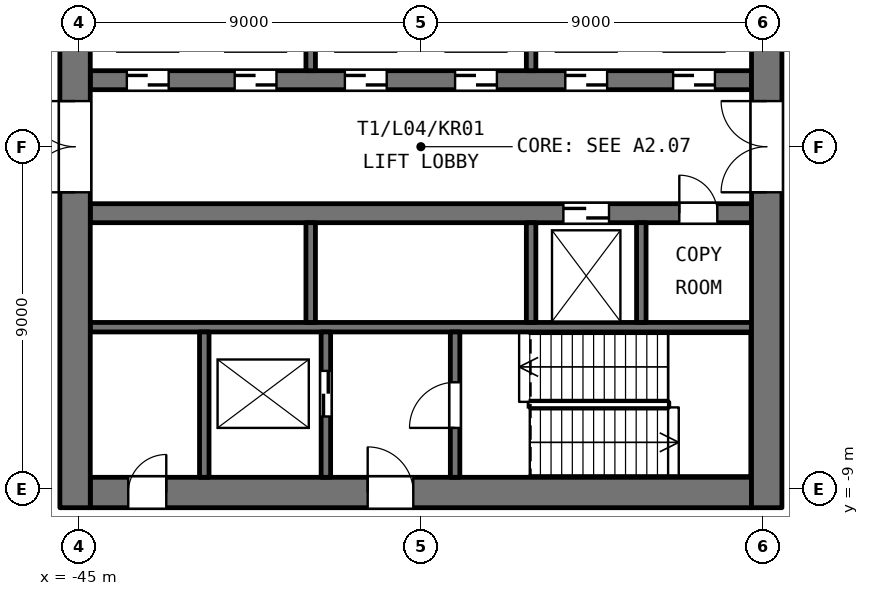
"""IFC4 building model, lengths in metres.
Left out: names, types, materials, properties, quantities, classifications, styles, units other than length and angle.
Written with IfcOpenShell. Run it as: python <this file> out.ifc"""

import sys

from ifc_helpers import new_model, si_unit, direction, frame, frame_2d, origin, place, context, subcontext, project, spatial, rectangle, extrude, element, fill, save


model = new_model("IFC4")
c1 = context("Model", 3, precision=1e-05, world=origin(), true_north=direction((0.0, 1.0)))
c2 = subcontext(c1, "Body", "Model", "MODEL_VIEW")
j1 = project(units=[si_unit("LENGTHUNIT", "METRE"), si_unit("PLANEANGLEUNIT", "RADIAN")], contexts=[c1])
p1 = place(None, origin())
s1 = spatial("IfcSite", under=j1, at=p1, CompositionType="ELEMENT")
p2 = place(p1, origin())
s2 = spatial("IfcBuilding", under=s1, at=p2, CompositionType="ELEMENT")
p3 = place(p2, frame((0.0, 0.0, 22.8)))
s3 = spatial("IfcBuildingStorey", under=s2, at=p3, CompositionType="ELEMENT", Elevation=22.8)
p4 = place(p3, frame((-44.7, -9.1, 0.0), z_axis=(0.0, 0.0, 1.0), x_axis=(1.0, 0.0, 0.0)))
e1 = element("IfcWall", 1, at=p4, inside=s3, PredefinedType="SHEAR", context=c2, shape_type="SweptSolid", body=[
    extrude(rectangle(XDim=17.4, YDim=0.8, at=frame_2d((8.7, 0.0))), origin(), (0.0, 0.0, 1.0), 4.5),
])
p5 = place(p4, frame((7.3, 0.0, 0.0)))
e2 = element("IfcOpeningElement", 2, at=p5, cuts=e1, PredefinedType="OPENING", context=c2, shape_type="SweptSolid", body=[
    extrude(rectangle(XDim=1.2, YDim=2.1, at=frame_2d((0.6, 1.05))), frame((0.0, 0.41, 0.0), z_axis=(0.0, -1.0, 0.0), x_axis=(1.0, 0.0, 0.0)), (0.0, 0.0, 1.0), 0.82),
])
p6 = place(p4, frame((1.0, 0.0, 0.0)))
e3 = element("IfcOpeningElement", 3, at=p6, cuts=e1, PredefinedType="OPENING", context=c2, shape_type="SweptSolid", body=[
    extrude(rectangle(XDim=1.0, YDim=2.1, at=frame_2d((0.5, 1.05))), frame((0.0, 0.41, 0.0), z_axis=(0.0, -1.0, 0.0), x_axis=(1.0, 0.0, 0.0)), (0.0, 0.0, 1.0), 0.82),
])
p7 = place(p3, frame((-44.7, -4.75, 0.0), z_axis=(0.0, 0.0, 1.0), x_axis=(1.0, 0.0, 0.0)))
e4 = element("IfcWall", 4, at=p7, inside=s3, PredefinedType="SHEAR", context=c2, shape_type="SweptSolid", body=[
    extrude(rectangle(XDim=17.4, YDim=0.25, at=frame_2d((8.7, 0.0))), origin(), (0.0, 0.0, 1.0), 4.5),
])
p8 = place(p3, frame((-44.7, -1.75, 0.0), z_axis=(0.0, 0.0, 1.0), x_axis=(1.0, 0.0, 0.0)))
e5 = element("IfcWall", 5, at=p8, inside=s3, PredefinedType="SHEAR", context=c2, shape_type="SweptSolid", body=[
    extrude(rectangle(XDim=17.4, YDim=0.5, at=frame_2d((8.7, 0.0))), origin(), (0.0, 0.0, 1.0), 4.5),
])
p9 = place(p8, frame((12.45, 0.0, 0.0)))
e6 = element("IfcOpeningElement", 6, at=p9, cuts=e5, PredefinedType="OPENING", context=c2, shape_type="SweptSolid", body=[
    extrude(rectangle(XDim=1.2, YDim=2.1, at=frame_2d((0.6, 1.05))), frame((0.0, 0.26, 0.0), z_axis=(0.0, -1.0, 0.0), x_axis=(1.0, 0.0, 0.0)), (0.0, 0.0, 1.0), 0.52),
])
p10 = place(p8, frame((15.5, 0.0, 0.0)))
e7 = element("IfcOpeningElement", 7, at=p10, cuts=e5, PredefinedType="OPENING", context=c2, shape_type="SweptSolid", body=[
    extrude(rectangle(XDim=1.0, YDim=2.1, at=frame_2d((0.5, 1.05))), frame((0.0, 0.26, 0.0), z_axis=(0.0, -1.0, 0.0), x_axis=(1.0, 0.0, 0.0)), (0.0, 0.0, 1.0), 0.52),
])
p11 = place(p3, frame((-44.7, 1.75, 0.0), z_axis=(0.0, 0.0, 1.0), x_axis=(1.0, 0.0, 0.0)))
e8 = element("IfcWall", 8, at=p11, inside=s3, PredefinedType="SHEAR", context=c2, shape_type="SweptSolid", body=[
    extrude(rectangle(XDim=17.4, YDim=0.5, at=frame_2d((8.7, 0.0))), origin(), (0.0, 0.0, 1.0), 4.5),
])
p12 = place(p11, frame((0.962, 0.0, 0.0)))
e9 = element("IfcOpeningElement", 9, at=p12, cuts=e8, PredefinedType="OPENING", context=c2, shape_type="SweptSolid", body=[
    extrude(rectangle(XDim=1.1, YDim=2.1, at=frame_2d((0.55, 1.05))), frame((0.0, 0.26, 0.0), z_axis=(0.0, -1.0, 0.0), x_axis=(1.0, 0.0, 0.0)), (0.0, 0.0, 1.0), 0.52),
])
p13 = place(p11, frame((3.8, 0.0, 0.0)))
e10 = element("IfcOpeningElement", 10, at=p13, cuts=e8, PredefinedType="OPENING", context=c2, shape_type="SweptSolid", body=[
    extrude(rectangle(XDim=1.1, YDim=2.1, at=frame_2d((0.55, 1.05))), frame((0.0, 0.26, 0.0), z_axis=(0.0, -1.0, 0.0), x_axis=(1.0, 0.0, 0.0)), (0.0, 0.0, 1.0), 0.52),
])
p14 = place(p11, frame((6.7, 0.0, 0.0)))
e11 = element("IfcOpeningElement", 11, at=p14, cuts=e8, PredefinedType="OPENING", context=c2, shape_type="SweptSolid", body=[
    extrude(rectangle(XDim=1.1, YDim=2.1, at=frame_2d((0.55, 1.05))), frame((0.0, 0.26, 0.0), z_axis=(0.0, -1.0, 0.0), x_axis=(1.0, 0.0, 0.0)), (0.0, 0.0, 1.0), 0.52),
])
p15 = place(p11, frame((9.6, 0.0, 0.0)))
e12 = element("IfcOpeningElement", 12, at=p15, cuts=e8, PredefinedType="OPENING", context=c2, shape_type="SweptSolid", body=[
    extrude(rectangle(XDim=1.1, YDim=2.1, at=frame_2d((0.55, 1.05))), frame((0.0, 0.26, 0.0), z_axis=(0.0, -1.0, 0.0), x_axis=(1.0, 0.0, 0.0)), (0.0, 0.0, 1.0), 0.52),
])
p16 = place(p11, frame((12.5, 0.0, 0.0)))
e13 = element("IfcOpeningElement", 13, at=p16, cuts=e8, PredefinedType="OPENING", context=c2, shape_type="SweptSolid", body=[
    extrude(rectangle(XDim=1.1, YDim=2.1, at=frame_2d((0.55, 1.05))), frame((0.0, 0.26, 0.0), z_axis=(0.0, -1.0, 0.0), x_axis=(1.0, 0.0, 0.0)), (0.0, 0.0, 1.0), 0.52),
])
p17 = place(p11, frame((15.337, 0.0, 0.0)))
e14 = element("IfcOpeningElement", 14, at=p17, cuts=e8, PredefinedType="OPENING", context=c2, shape_type="SweptSolid", body=[
    extrude(rectangle(XDim=1.1, YDim=2.1, at=frame_2d((0.55, 1.05))), frame((0.0, 0.26, 0.0), z_axis=(0.0, -1.0, 0.0), x_axis=(1.0, 0.0, 0.0)), (0.0, 0.0, 1.0), 0.52),
])
p18 = place(p3, frame((-45.1, -9.5, 0.0), z_axis=(0.0, 0.0, 1.0), x_axis=(0.0, 1.0, 0.0)))
e15 = element("IfcWall", 15, at=p18, inside=s3, PredefinedType="SHEAR", context=c2, shape_type="SweptSolid", body=[
    extrude(rectangle(XDim=19.0, YDim=0.8, at=frame_2d((9.5, 0.0))), origin(), (0.0, 0.0, 1.0), 4.5),
])
p19 = place(p18, frame((8.3, 0.0, 0.0)))
e16 = element("IfcOpeningElement", 16, at=p19, cuts=e15, PredefinedType="OPENING", context=c2, shape_type="SweptSolid", body=[
    extrude(rectangle(XDim=2.4, YDim=2.1, at=frame_2d((1.2, 1.05))), frame((0.0, 0.41, 0.0), z_axis=(0.0, -1.0, 0.0), x_axis=(1.0, 0.0, 0.0)), (0.0, 0.0, 1.0), 0.82),
])
p20 = place(p3, frame((-41.7, -8.7, 0.0), z_axis=(0.0, 0.0, 1.0), x_axis=(0.0, 1.0, 0.0)))
e17 = element("IfcWall", 17, at=p20, inside=s3, PredefinedType="SHEAR", context=c2, shape_type="SweptSolid", body=[
    extrude(rectangle(XDim=3.825, YDim=0.25, at=frame_2d((1.913, 0.0))), origin(), (0.0, 0.0, 1.0), 4.5),
])
for number, where, z_axis, x_axis in (
    (18, (-38.9, -4.625, 0.0), (0.0, 0.0, 1.0), (0.0, 1.0, 0.0)),
    (19, (-38.9, 2.0, 0.0), (0.0, 0.0, 1.0), (0.0, 1.0, 0.0)),
):
    element("IfcWall", number, at=place(p3, frame(where, z_axis=z_axis, x_axis=x_axis)), inside=s3, PredefinedType="SHEAR", context=c2, shape_type="SweptSolid", body=[
        extrude(rectangle(XDim=2.625, YDim=0.25, at=frame_2d((1.312, 0.0))), origin(), (0.0, 0.0, 1.0), 4.5),
    ])
p21 = place(p3, frame((-38.5, -8.7, 0.0), z_axis=(0.0, 0.0, 1.0), x_axis=(0.0, 1.0, 0.0)))
e20 = element("IfcWall", 20, at=p21, inside=s3, PredefinedType="SHEAR", context=c2, shape_type="SweptSolid", body=[
    extrude(rectangle(XDim=3.825, YDim=0.25, at=frame_2d((1.913, 0.0))), origin(), (0.0, 0.0, 1.0), 4.5),
])
p22 = place(p21, frame((1.6, 0.0, 0.0)))
e21 = element("IfcOpeningElement", 21, at=p22, cuts=e20, PredefinedType="OPENING", context=c2, shape_type="SweptSolid", body=[
    extrude(rectangle(XDim=1.2, YDim=2.1, at=frame_2d((0.6, 1.05))), frame((0.0, 0.135, 0.0), z_axis=(0.0, -1.0, 0.0), x_axis=(1.0, 0.0, 0.0)), (0.0, 0.0, 1.0), 0.27),
])
p23 = place(p3, frame((-35.1, -8.7, 0.0), z_axis=(0.0, 0.0, 1.0), x_axis=(0.0, 1.0, 0.0)))
e22 = element("IfcWall", 22, at=p23, inside=s3, PredefinedType="SHEAR", context=c2, shape_type="SweptSolid", body=[
    extrude(rectangle(XDim=3.825, YDim=0.25, at=frame_2d((1.913, 0.0))), origin(), (0.0, 0.0, 1.0), 4.5),
])
p24 = place(p23, frame((1.3, 0.0, 0.0)))
e23 = element("IfcOpeningElement", 23, at=p24, cuts=e22, PredefinedType="OPENING", context=c2, shape_type="SweptSolid", body=[
    extrude(rectangle(XDim=1.2, YDim=2.1, at=frame_2d((0.6, 1.05))), frame((0.0, 0.135, 0.0), z_axis=(0.0, -1.0, 0.0), x_axis=(1.0, 0.0, 0.0)), (0.0, 0.0, 1.0), 0.27),
])
for number, where, z_axis, x_axis in (
    (24, (-33.1, -4.625, 0.0), (0.0, 0.0, 1.0), (0.0, 1.0, 0.0)),
    (25, (-33.1, 2.0, 0.0), (0.0, 0.0, 1.0), (0.0, 1.0, 0.0)),
    (26, (-30.2, -4.625, 0.0), (0.0, 0.0, 1.0), (0.0, 1.0, 0.0)),
):
    element("IfcWall", number, at=place(p3, frame(where, z_axis=z_axis, x_axis=x_axis)), inside=s3, PredefinedType="SHEAR", context=c2, shape_type="SweptSolid", body=[
        extrude(rectangle(XDim=2.625, YDim=0.25, at=frame_2d((1.312, 0.0))), origin(), (0.0, 0.0, 1.0), 4.5),
    ])
p25 = place(p3, frame((-26.9, -9.5, 0.0), z_axis=(0.0, 0.0, 1.0), x_axis=(0.0, 1.0, 0.0)))
e27 = element("IfcWall", 27, at=p25, inside=s3, PredefinedType="SHEAR", context=c2, shape_type="SweptSolid", body=[
    extrude(rectangle(XDim=19.0, YDim=0.8, at=frame_2d((9.5, 0.0))), origin(), (0.0, 0.0, 1.0), 4.5),
])
p26 = place(p25, frame((8.3, 0.0, 0.0)))
e28 = element("IfcOpeningElement", 28, at=p26, cuts=e27, PredefinedType="OPENING", context=c2, shape_type="SweptSolid", body=[
    extrude(rectangle(XDim=2.4, YDim=2.1, at=frame_2d((1.2, 1.05))), frame((0.0, 0.41, 0.0), z_axis=(0.0, -1.0, 0.0), x_axis=(1.0, 0.0, 0.0)), (0.0, 0.0, 1.0), 0.82),
])
p27 = place(p19, origin())
e29 = element("IfcDoor", 29, at=p27, inside=s3, OperationType="DOUBLE_DOOR_SINGLE_SWING", PredefinedType="DOOR", context=c2, shape_type="SweptSolid", body=[
    extrude(rectangle(XDim=2.4, YDim=2.1, at=frame_2d((1.2, 1.05))), frame((0.0, -0.225, 0.0), z_axis=(0.0, -1.0, 0.0), x_axis=(1.0, 0.0, 0.0)), (0.0, 0.0, 1.0), 0.05),
])
fill(e16, e29)
p28 = place(p26, origin())
e30 = element("IfcDoor", 30, at=p28, inside=s3, OperationType="DOUBLE_DOOR_SINGLE_SWING", PredefinedType="DOOR", context=c2, shape_type="SweptSolid", body=[
    extrude(rectangle(XDim=2.4, YDim=2.1, at=frame_2d((1.2, 1.05))), frame((0.0, 0.275, 0.0), z_axis=(0.0, -1.0, 0.0), x_axis=(1.0, 0.0, 0.0)), (0.0, 0.0, 1.0), 0.05),
])
fill(e28, e30)
p29 = place(p12, origin())
e31 = element("IfcDoor", 31, at=p29, inside=s3, OperationType="SLIDING_TO_LEFT", PredefinedType="DOOR", context=c2, shape_type="SweptSolid", body=[
    extrude(rectangle(XDim=1.1, YDim=2.1, at=frame_2d((0.55, 1.05))), frame((0.0, 0.025, 0.0), z_axis=(0.0, -1.0, 0.0), x_axis=(1.0, 0.0, 0.0)), (0.0, 0.0, 1.0), 0.05),
])
fill(e9, e31)
p30 = place(p13, origin())
e32 = element("IfcDoor", 32, at=p30, inside=s3, OperationType="SLIDING_TO_LEFT", PredefinedType="DOOR", context=c2, shape_type="SweptSolid", body=[
    extrude(rectangle(XDim=1.1, YDim=2.1, at=frame_2d((0.55, 1.05))), frame((0.0, 0.025, 0.0), z_axis=(0.0, -1.0, 0.0), x_axis=(1.0, 0.0, 0.0)), (0.0, 0.0, 1.0), 0.05),
])
fill(e10, e32)
p31 = place(p14, origin())
e33 = element("IfcDoor", 33, at=p31, inside=s3, OperationType="SLIDING_TO_LEFT", PredefinedType="DOOR", context=c2, shape_type="SweptSolid", body=[
    extrude(rectangle(XDim=1.1, YDim=2.1, at=frame_2d((0.55, 1.05))), frame((0.0, 0.025, 0.0), z_axis=(0.0, -1.0, 0.0), x_axis=(1.0, 0.0, 0.0)), (0.0, 0.0, 1.0), 0.05),
])
fill(e11, e33)
p32 = place(p15, origin())
e34 = element("IfcDoor", 34, at=p32, inside=s3, OperationType="SLIDING_TO_LEFT", PredefinedType="DOOR", context=c2, shape_type="SweptSolid", body=[
    extrude(rectangle(XDim=1.1, YDim=2.1, at=frame_2d((0.55, 1.05))), frame((0.0, 0.025, 0.0), z_axis=(0.0, -1.0, 0.0), x_axis=(1.0, 0.0, 0.0)), (0.0, 0.0, 1.0), 0.05),
])
fill(e12, e34)
p33 = place(p16, origin())
e35 = element("IfcDoor", 35, at=p33, inside=s3, OperationType="SLIDING_TO_LEFT", PredefinedType="DOOR", context=c2, shape_type="SweptSolid", body=[
    extrude(rectangle(XDim=1.1, YDim=2.1, at=frame_2d((0.55, 1.05))), frame((0.0, 0.025, 0.0), z_axis=(0.0, -1.0, 0.0), x_axis=(1.0, 0.0, 0.0)), (0.0, 0.0, 1.0), 0.05),
])
fill(e13, e35)
p34 = place(p17, origin())
e36 = element("IfcDoor", 36, at=p34, inside=s3, OperationType="SLIDING_TO_LEFT", PredefinedType="DOOR", context=c2, shape_type="SweptSolid", body=[
    extrude(rectangle(XDim=1.1, YDim=2.1, at=frame_2d((0.55, 1.05))), frame((0.0, 0.025, 0.0), z_axis=(0.0, -1.0, 0.0), x_axis=(1.0, 0.0, 0.0)), (0.0, 0.0, 1.0), 0.05),
])
fill(e14, e36)
p35 = place(p9, origin())
e37 = element("IfcDoor", 37, at=p35, inside=s3, OperationType="SLIDING_TO_LEFT", PredefinedType="DOOR", context=c2, shape_type="SweptSolid", body=[
    extrude(rectangle(XDim=1.2, YDim=2.1, at=frame_2d((0.6, 1.05))), frame((0.0, 0.025, 0.0), z_axis=(0.0, -1.0, 0.0), x_axis=(1.0, 0.0, 0.0)), (0.0, 0.0, 1.0), 0.05),
])
fill(e6, e37)
p36 = place(p22, origin())
e38 = element("IfcDoor", 38, at=p36, inside=s3, OperationType="SLIDING_TO_LEFT", PredefinedType="DOOR", context=c2, shape_type="SweptSolid", body=[
    extrude(rectangle(XDim=1.2, YDim=2.1, at=frame_2d((0.6, 1.05))), frame((0.0, 0.025, 0.0), z_axis=(0.0, -1.0, 0.0), x_axis=(1.0, 0.0, 0.0)), (0.0, 0.0, 1.0), 0.05),
])
fill(e21, e38)
p37 = place(p10, origin())
e39 = element("IfcDoor", 39, at=p37, inside=s3, OperationType="SINGLE_SWING_LEFT", PredefinedType="DOOR", context=c2, shape_type="SweptSolid", body=[
    extrude(rectangle(XDim=1.0, YDim=2.1, at=frame_2d((0.5, 1.05))), frame((0.0, 0.025, 0.0), z_axis=(0.0, -1.0, 0.0), x_axis=(1.0, 0.0, 0.0)), (0.0, 0.0, 1.0), 0.05),
])
fill(e7, e39)
p38 = place(p24, origin())
e40 = element("IfcDoor", 40, at=p38, inside=s3, OperationType="SINGLE_SWING_LEFT", PredefinedType="DOOR", context=c2, shape_type="SweptSolid", body=[
    extrude(rectangle(XDim=1.2, YDim=2.1, at=frame_2d((0.6, 1.05))), frame((0.0, 0.025, 0.0), z_axis=(0.0, -1.0, 0.0), x_axis=(1.0, 0.0, 0.0)), (0.0, 0.0, 1.0), 0.05),
])
fill(e23, e40)
p39 = place(p5, origin())
e41 = element("IfcDoor", 41, at=p39, inside=s3, OperationType="SINGLE_SWING_LEFT", PredefinedType="DOOR", context=c2, shape_type="SweptSolid", body=[
    extrude(rectangle(XDim=1.2, YDim=2.1, at=frame_2d((0.6, 1.05))), frame((0.0, 0.275, 0.0), z_axis=(0.0, -1.0, 0.0), x_axis=(1.0, 0.0, 0.0)), (0.0, 0.0, 1.0), 0.05),
])
fill(e2, e41)
p40 = place(p6, origin())
e42 = element("IfcDoor", 42, at=p40, inside=s3, OperationType="SINGLE_SWING_RIGHT", PredefinedType="DOOR", context=c2, shape_type="SweptSolid", body=[
    extrude(rectangle(XDim=1.0, YDim=2.1, at=frame_2d((0.5, 1.05))), frame((0.0, 0.275, 0.0), z_axis=(0.0, -1.0, 0.0), x_axis=(1.0, 0.0, 0.0)), (0.0, 0.0, 1.0), 0.05),
])
fill(e3, e42)
save(model, sys.argv[1])
